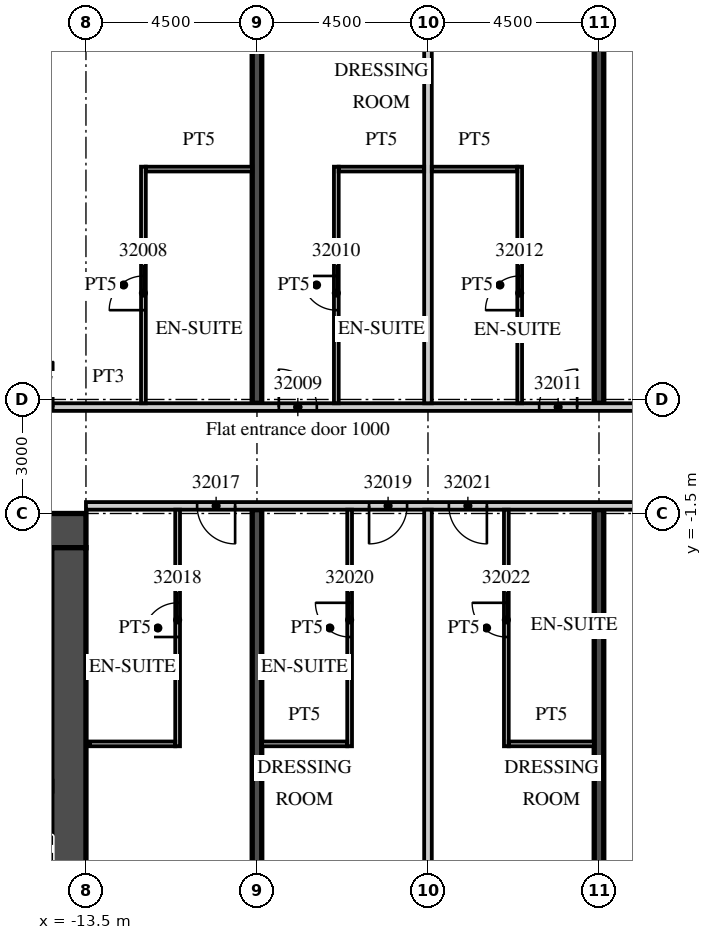
"""IFC4 building model, lengths in metres.
Left out: names, types, materials, properties, quantities, classifications, styles, units other than length and angle.
Written with IfcOpenShell. Run it as: python <this file> out.ifc"""

import sys

from ifc_helpers import new_model, si_unit, direction, frame, frame_2d, origin, place, context, subcontext, project, spatial, rectangle, extrude, element, fill, save


model = new_model("IFC4")
c1 = context("Model", 3, precision=1e-05, world=origin(), true_north=direction((0.0, 1.0)))
c2 = subcontext(c1, "Body", "Model", "MODEL_VIEW")
j1 = project(units=[si_unit("LENGTHUNIT", "METRE"), si_unit("PLANEANGLEUNIT", "RADIAN")], contexts=[c1])
p1 = place(None, origin())
s1 = spatial("IfcSite", under=j1, at=p1, CompositionType="ELEMENT")
p2 = place(p1, origin())
s2 = spatial("IfcBuilding", under=s1, at=p2, CompositionType="ELEMENT")
p3 = place(p2, frame((0.0, 0.0, 140.5)))
s3 = spatial("IfcBuildingStorey", under=s2, at=p3, CompositionType="ELEMENT", Elevation=140.5)
p4 = place(p3, frame((-9.0, -21.777, 0.0), z_axis=(0.0, 0.0, 1.0), x_axis=(0.0, 1.0, 0.0)))
e1 = element("IfcWall", 1, at=p4, inside=s3, PredefinedType="SHEAR", context=c2, shape_type="SweptSolid", body=[
    extrude(rectangle(XDim=20.377, YDim=0.25, at=frame_2d((10.188, 0.0))), origin(), (0.0, 0.0, 1.0), 3.3),
])
p5 = place(p3, frame((-9.0, 1.4, 0.0), z_axis=(0.0, 0.0, 1.0), x_axis=(0.0, 1.0, 0.0)))
e2 = element("IfcWall", 2, at=p5, inside=s3, PredefinedType="SHEAR", context=c2, shape_type="SweptSolid", body=[
    extrude(rectangle(XDim=19.073, YDim=0.25, at=frame_2d((9.537, 0.0))), origin(), (0.0, 0.0, 1.0), 3.3),
])
p6 = place(p3, frame((0.0, -20.91, 0.0), z_axis=(0.0, 0.0, 1.0), x_axis=(0.0, 1.0, 0.0)))
e3 = element("IfcWall", 3, at=p6, inside=s3, PredefinedType="SHEAR", context=c2, shape_type="SweptSolid", body=[
    extrude(rectangle(XDim=19.51, YDim=0.25, at=frame_2d((9.755, 0.0))), origin(), (0.0, 0.0, 1.0), 3.3),
])
p7 = place(p3, frame((0.0, 1.4, 0.0), z_axis=(0.0, 0.0, 1.0), x_axis=(0.0, 1.0, 0.0)))
e4 = element("IfcWall", 4, at=p7, inside=s3, PredefinedType="SHEAR", context=c2, shape_type="SweptSolid", body=[
    extrude(rectangle(XDim=19.94, YDim=0.25, at=frame_2d((9.97, 0.0))), origin(), (0.0, 0.0, 1.0), 3.3),
])
p8 = place(p3, frame((-39.316, 1.3, 0.0), z_axis=(0.0, 0.0, 1.0), x_axis=(1.0, 0.0, 0.0)))
e5 = element("IfcWall", 5, at=p8, inside=s3, PredefinedType="PARTITIONING", context=c2, shape_type="SweptSolid", body=[
    extrude(rectangle(XDim=52.816, YDim=0.2, at=frame_2d((26.408, 0.0))), origin(), (0.0, 0.0, 1.0), 3.02),
])
p9 = place(p8, frame((0.15, 0.0, 0.0)))
e6 = element("IfcOpeningElement", 6, at=p9, cuts=e5, PredefinedType="OPENING", context=c2, shape_type="SweptSolid", body=[
    extrude(rectangle(XDim=0.9, YDim=2.1, at=frame_2d((0.45, 1.05))), frame((0.0, 0.11, 0.0), z_axis=(0.0, -1.0, 0.0), x_axis=(1.0, 0.0, 0.0)), (0.0, 0.0, 1.0), 0.22),
])
p10 = place(p8, frame((8.679, 0.0, 0.0)))
e7 = element("IfcOpeningElement", 7, at=p10, cuts=e5, PredefinedType="OPENING", context=c2, shape_type="SweptSolid", body=[
    extrude(rectangle(XDim=1.2, YDim=2.1, at=frame_2d((0.6, 1.05))), frame((0.0, 0.11, 0.0), z_axis=(0.0, -1.0, 0.0), x_axis=(1.0, 0.0, 0.0)), (0.0, 0.0, 1.0), 0.22),
])
p11 = place(p8, frame((17.678, 0.0, 0.0)))
e8 = element("IfcOpeningElement", 8, at=p11, cuts=e5, PredefinedType="OPENING", context=c2, shape_type="SweptSolid", body=[
    extrude(rectangle(XDim=1.2, YDim=2.1, at=frame_2d((0.6, 1.05))), frame((0.0, 0.11, 0.0), z_axis=(0.0, -1.0, 0.0), x_axis=(1.0, 0.0, 0.0)), (0.0, 0.0, 1.0), 0.22),
])
p12 = place(p8, frame((23.754, 0.0, 0.0)))
e9 = element("IfcOpeningElement", 9, at=p12, cuts=e5, PredefinedType="OPENING", context=c2, shape_type="SweptSolid", body=[
    extrude(rectangle(XDim=1.2, YDim=2.1, at=frame_2d((0.6, 1.05))), frame((0.0, 0.11, 0.0), z_axis=(0.0, -1.0, 0.0), x_axis=(1.0, 0.0, 0.0)), (0.0, 0.0, 1.0), 0.22),
])
p13 = place(p8, frame((30.891, 0.0, 0.0)))
e10 = element("IfcOpeningElement", 10, at=p13, cuts=e5, PredefinedType="OPENING", context=c2, shape_type="SweptSolid", body=[
    extrude(rectangle(XDim=1.0, YDim=2.1, at=frame_2d((0.5, 1.05))), frame((0.0, 0.11, 0.0), z_axis=(0.0, -1.0, 0.0), x_axis=(1.0, 0.0, 0.0)), (0.0, 0.0, 1.0), 0.22),
])
p14 = place(p8, frame((37.741, 0.0, 0.0)))
e11 = element("IfcOpeningElement", 11, at=p14, cuts=e5, PredefinedType="OPENING", context=c2, shape_type="SweptSolid", body=[
    extrude(rectangle(XDim=1.0, YDim=2.1, at=frame_2d((0.5, 1.05))), frame((0.0, 0.11, 0.0), z_axis=(0.0, -1.0, 0.0), x_axis=(1.0, 0.0, 0.0)), (0.0, 0.0, 1.0), 0.22),
])
p15 = place(p8, frame((41.754, 0.0, 0.0)))
e12 = element("IfcOpeningElement", 12, at=p15, cuts=e5, PredefinedType="OPENING", context=c2, shape_type="SweptSolid", body=[
    extrude(rectangle(XDim=1.2, YDim=2.1, at=frame_2d((0.6, 1.05))), frame((0.0, 0.11, 0.0), z_axis=(0.0, -1.0, 0.0), x_axis=(1.0, 0.0, 0.0)), (0.0, 0.0, 1.0), 0.22),
])
p16 = place(p8, frame((48.891, 0.0, 0.0)))
e13 = element("IfcOpeningElement", 13, at=p16, cuts=e5, PredefinedType="OPENING", context=c2, shape_type="SweptSolid", body=[
    extrude(rectangle(XDim=1.0, YDim=2.1, at=frame_2d((0.5, 1.05))), frame((0.0, 0.11, 0.0), z_axis=(0.0, -1.0, 0.0), x_axis=(1.0, 0.0, 0.0)), (0.0, 0.0, 1.0), 0.22),
])
p17 = place(p3, frame((-11.988, 1.4, 0.0), z_axis=(0.0, 0.0, 1.0), x_axis=(0.0, 1.0, 0.0)))
e14 = element("IfcWall", 14, at=p17, inside=s3, PredefinedType="PARTITIONING", context=c2, shape_type="SweptSolid", body=[
    extrude(rectangle(XDim=6.225, YDim=0.125, at=frame_2d((3.113, 0.0))), origin(), (0.0, 0.0, 1.0), 3.02),
])
p18 = place(p17, frame((2.45, 0.0, 0.0)))
e15 = element("IfcOpeningElement", 15, at=p18, cuts=e14, PredefinedType="OPENING", context=c2, shape_type="SweptSolid", body=[
    extrude(rectangle(XDim=0.9, YDim=2.1, at=frame_2d((0.45, 1.05))), frame((0.0, 0.073, 0.0), z_axis=(0.0, -1.0, 0.0), x_axis=(1.0, 0.0, 0.0)), (0.0, 0.0, 1.0), 0.145),
])
p19 = place(p3, frame((-11.925, 7.562, 0.0), z_axis=(0.0, 0.0, 1.0), x_axis=(1.0, 0.0, 0.0)))
e16 = element("IfcWall", 16, at=p19, inside=s3, PredefinedType="PARTITIONING", context=c2, shape_type="SweptSolid", body=[
    extrude(rectangle(XDim=2.8, YDim=0.125, at=frame_2d((1.4, 0.0))), origin(), (0.0, 0.0, 1.0), 3.02),
])
p20 = place(p3, frame((-4.5, 1.4, 0.0), z_axis=(0.0, 0.0, 1.0), x_axis=(0.0, 1.0, 0.0)))
e17 = element("IfcWall", 17, at=p20, inside=s3, PredefinedType="PARTITIONING", context=c2, shape_type="SweptSolid", body=[
    extrude(rectangle(XDim=19.529, YDim=0.2, at=frame_2d((9.765, 0.0))), origin(), (0.0, 0.0, 1.0), 3.02),
])
p21 = place(p3, frame((-6.912, 1.4, 0.0), z_axis=(0.0, 0.0, 1.0), x_axis=(0.0, 1.0, 0.0)))
e18 = element("IfcWall", 18, at=p21, inside=s3, PredefinedType="PARTITIONING", context=c2, shape_type="SweptSolid", body=[
    extrude(rectangle(XDim=6.225, YDim=0.125, at=frame_2d((3.113, 0.0))), origin(), (0.0, 0.0, 1.0), 3.02),
])
p22 = place(p21, frame((2.45, 0.0, 0.0)))
e19 = element("IfcOpeningElement", 19, at=p22, cuts=e18, PredefinedType="OPENING", context=c2, shape_type="SweptSolid", body=[
    extrude(rectangle(XDim=0.9, YDim=2.1, at=frame_2d((0.45, 1.05))), frame((0.0, 0.073, 0.0), z_axis=(0.0, -1.0, 0.0), x_axis=(1.0, 0.0, 0.0)), (0.0, 0.0, 1.0), 0.145),
])
p23 = place(p3, frame((-6.85, 7.562, 0.0), z_axis=(0.0, 0.0, 1.0), x_axis=(1.0, 0.0, 0.0)))
e20 = element("IfcWall", 20, at=p23, inside=s3, PredefinedType="PARTITIONING", context=c2, shape_type="SweptSolid", body=[
    extrude(rectangle(XDim=2.25, YDim=0.125, at=frame_2d((1.125, 0.0))), origin(), (0.0, 0.0, 1.0), 3.02),
])
p24 = place(p3, frame((-2.087, 1.4, 0.0), z_axis=(0.0, 0.0, 1.0), x_axis=(0.0, 1.0, 0.0)))
e21 = element("IfcWall", 21, at=p24, inside=s3, PredefinedType="PARTITIONING", context=c2, shape_type="SweptSolid", body=[
    extrude(rectangle(XDim=6.225, YDim=0.125, at=frame_2d((3.113, 0.0))), origin(), (0.0, 0.0, 1.0), 3.02),
])
p25 = place(p24, frame((2.45, 0.0, 0.0)))
e22 = element("IfcOpeningElement", 22, at=p25, cuts=e21, PredefinedType="OPENING", context=c2, shape_type="SweptSolid", body=[
    extrude(rectangle(XDim=0.9, YDim=2.1, at=frame_2d((0.45, 1.05))), frame((0.0, 0.073, 0.0), z_axis=(0.0, -1.0, 0.0), x_axis=(1.0, 0.0, 0.0)), (0.0, 0.0, 1.0), 0.145),
])
p26 = place(p3, frame((-4.4, 7.562, 0.0), z_axis=(0.0, 0.0, 1.0), x_axis=(1.0, 0.0, 0.0)))
e23 = element("IfcWall", 23, at=p26, inside=s3, PredefinedType="PARTITIONING", context=c2, shape_type="SweptSolid", body=[
    extrude(rectangle(XDim=2.25, YDim=0.125, at=frame_2d((1.125, 0.0))), origin(), (0.0, 0.0, 1.0), 3.02),
])
p27 = place(p3, frame((-13.5, -1.3, 0.0), z_axis=(0.0, 0.0, 1.0), x_axis=(1.0, 0.0, 0.0)))
e24 = element("IfcWall", 24, at=p27, inside=s3, PredefinedType="PARTITIONING", context=c2, shape_type="SweptSolid", body=[
    extrude(rectangle(XDim=60.932, YDim=0.2, at=frame_2d((30.466, 0.0))), origin(), (0.0, 0.0, 1.0), 3.02),
])
p28 = place(p27, frame((2.925, 0.0, 0.0)))
e25 = element("IfcOpeningElement", 25, at=p28, cuts=e24, PredefinedType="OPENING", context=c2, shape_type="SweptSolid", body=[
    extrude(rectangle(XDim=1.0, YDim=2.1, at=frame_2d((0.5, 1.05))), frame((0.0, 0.11, 0.0), z_axis=(0.0, -1.0, 0.0), x_axis=(1.0, 0.0, 0.0)), (0.0, 0.0, 1.0), 0.22),
])
p29 = place(p27, frame((7.45, 0.0, 0.0)))
e26 = element("IfcOpeningElement", 26, at=p29, cuts=e24, PredefinedType="OPENING", context=c2, shape_type="SweptSolid", body=[
    extrude(rectangle(XDim=1.0, YDim=2.1, at=frame_2d((0.5, 1.05))), frame((0.0, 0.11, 0.0), z_axis=(0.0, -1.0, 0.0), x_axis=(1.0, 0.0, 0.0)), (0.0, 0.0, 1.0), 0.22),
])
p30 = place(p27, frame((9.55, 0.0, 0.0)))
e27 = element("IfcOpeningElement", 27, at=p30, cuts=e24, PredefinedType="OPENING", context=c2, shape_type="SweptSolid", body=[
    extrude(rectangle(XDim=1.0, YDim=2.1, at=frame_2d((0.5, 1.05))), frame((0.0, 0.11, 0.0), z_axis=(0.0, -1.0, 0.0), x_axis=(1.0, 0.0, 0.0)), (0.0, 0.0, 1.0), 0.22),
])
p31 = place(p27, frame((15.938, 0.0, 0.0)))
e28 = element("IfcOpeningElement", 28, at=p31, cuts=e24, PredefinedType="OPENING", context=c2, shape_type="SweptSolid", body=[
    extrude(rectangle(XDim=1.2, YDim=2.1, at=frame_2d((0.6, 1.05))), frame((0.0, 0.11, 0.0), z_axis=(0.0, -1.0, 0.0), x_axis=(1.0, 0.0, 0.0)), (0.0, 0.0, 1.0), 0.22),
])
p32 = place(p27, frame((24.938, 0.0, 0.0)))
e29 = element("IfcOpeningElement", 29, at=p32, cuts=e24, PredefinedType="OPENING", context=c2, shape_type="SweptSolid", body=[
    extrude(rectangle(XDim=1.2, YDim=2.1, at=frame_2d((0.6, 1.05))), frame((0.0, 0.11, 0.0), z_axis=(0.0, -1.0, 0.0), x_axis=(1.0, 0.0, 0.0)), (0.0, 0.0, 1.0), 0.22),
])
p33 = place(p27, frame((32.075, 0.0, 0.0)))
e30 = element("IfcOpeningElement", 30, at=p33, cuts=e24, PredefinedType="OPENING", context=c2, shape_type="SweptSolid", body=[
    extrude(rectangle(XDim=1.0, YDim=2.1, at=frame_2d((0.5, 1.05))), frame((0.0, 0.11, 0.0), z_axis=(0.0, -1.0, 0.0), x_axis=(1.0, 0.0, 0.0)), (0.0, 0.0, 1.0), 0.22),
])
p34 = place(p27, frame((36.55, 0.0, 0.0)))
e31 = element("IfcOpeningElement", 31, at=p34, cuts=e24, PredefinedType="OPENING", context=c2, shape_type="SweptSolid", body=[
    extrude(rectangle(XDim=1.0, YDim=2.1, at=frame_2d((0.5, 1.05))), frame((0.0, 0.11, 0.0), z_axis=(0.0, -1.0, 0.0), x_axis=(1.0, 0.0, 0.0)), (0.0, 0.0, 1.0), 0.22),
])
p35 = place(p27, frame((45.862, 0.0, 0.0)))
e32 = element("IfcOpeningElement", 32, at=p35, cuts=e24, PredefinedType="OPENING", context=c2, shape_type="SweptSolid", body=[
    extrude(rectangle(XDim=1.2, YDim=2.1, at=frame_2d((0.6, 1.05))), frame((0.0, 0.11, 0.0), z_axis=(0.0, -1.0, 0.0), x_axis=(1.0, 0.0, 0.0)), (0.0, 0.0, 1.0), 0.22),
])
p36 = place(p27, frame((50.075, 0.0, 0.0)))
e33 = element("IfcOpeningElement", 33, at=p36, cuts=e24, PredefinedType="OPENING", context=c2, shape_type="SweptSolid", body=[
    extrude(rectangle(XDim=1.0, YDim=2.1, at=frame_2d((0.5, 1.05))), frame((0.0, 0.11, 0.0), z_axis=(0.0, -1.0, 0.0), x_axis=(1.0, 0.0, 0.0)), (0.0, 0.0, 1.0), 0.22),
])
p37 = place(p27, frame((56.95, 0.0, 0.0)))
e34 = element("IfcOpeningElement", 34, at=p37, cuts=e24, PredefinedType="OPENING", context=c2, shape_type="SweptSolid", body=[
    extrude(rectangle(XDim=1.0, YDim=2.1, at=frame_2d((0.5, 1.05))), frame((0.0, 0.11, 0.0), z_axis=(0.0, -1.0, 0.0), x_axis=(1.0, 0.0, 0.0)), (0.0, 0.0, 1.0), 0.22),
])
p38 = place(p27, frame((59.882, 0.0, 0.0)))
e35 = element("IfcOpeningElement", 35, at=p38, cuts=e24, PredefinedType="OPENING", context=c2, shape_type="SweptSolid", body=[
    extrude(rectangle(XDim=0.9, YDim=2.1, at=frame_2d((0.45, 1.05))), frame((0.0, 0.11, 0.0), z_axis=(0.0, -1.0, 0.0), x_axis=(1.0, 0.0, 0.0)), (0.0, 0.0, 1.0), 0.22),
])
p39 = place(p3, frame((-11.088, -7.625, 0.0), z_axis=(0.0, 0.0, 1.0), x_axis=(0.0, 1.0, 0.0)))
e36 = element("IfcWall", 36, at=p39, inside=s3, PredefinedType="PARTITIONING", context=c2, shape_type="SweptSolid", body=[
    extrude(rectangle(XDim=6.225, YDim=0.125, at=frame_2d((3.113, 0.0))), origin(), (0.0, 0.0, 1.0), 3.02),
])
p40 = place(p39, frame((2.875, 0.0, 0.0)))
e37 = element("IfcOpeningElement", 37, at=p40, cuts=e36, PredefinedType="OPENING", context=c2, shape_type="SweptSolid", body=[
    extrude(rectangle(XDim=0.9, YDim=2.1, at=frame_2d((0.45, 1.05))), frame((0.0, 0.073, 0.0), z_axis=(0.0, -1.0, 0.0), x_axis=(1.0, 0.0, 0.0)), (0.0, 0.0, 1.0), 0.145),
])
p41 = place(p3, frame((-13.4, -7.562, 0.0), z_axis=(0.0, 0.0, 1.0), x_axis=(1.0, 0.0, 0.0)))
e38 = element("IfcWall", 38, at=p41, inside=s3, PredefinedType="PARTITIONING", context=c2, shape_type="SweptSolid", body=[
    extrude(rectangle(XDim=2.25, YDim=0.125, at=frame_2d((1.125, 0.0))), origin(), (0.0, 0.0, 1.0), 3.02),
])
p42 = place(p3, frame((-4.5, -21.366, 0.0), z_axis=(0.0, 0.0, 1.0), x_axis=(0.0, 1.0, 0.0)))
e39 = element("IfcWall", 39, at=p42, inside=s3, PredefinedType="PARTITIONING", context=c2, shape_type="SweptSolid", body=[
    extrude(rectangle(XDim=19.966, YDim=0.2, at=frame_2d((9.983, 0.0))), origin(), (0.0, 0.0, 1.0), 3.02),
])
p43 = place(p3, frame((-6.562, -7.625, 0.0), z_axis=(0.0, 0.0, 1.0), x_axis=(0.0, 1.0, 0.0)))
e40 = element("IfcWall", 40, at=p43, inside=s3, PredefinedType="PARTITIONING", context=c2, shape_type="SweptSolid", body=[
    extrude(rectangle(XDim=6.225, YDim=0.125, at=frame_2d((3.113, 0.0))), origin(), (0.0, 0.0, 1.0), 3.02),
])
p44 = place(p43, frame((2.875, 0.0, 0.0)))
e41 = element("IfcOpeningElement", 41, at=p44, cuts=e40, PredefinedType="OPENING", context=c2, shape_type="SweptSolid", body=[
    extrude(rectangle(XDim=0.9, YDim=2.1, at=frame_2d((0.45, 1.05))), frame((0.0, 0.073, 0.0), z_axis=(0.0, -1.0, 0.0), x_axis=(1.0, 0.0, 0.0)), (0.0, 0.0, 1.0), 0.145),
])
p45 = place(p3, frame((-8.875, -7.562, 0.0), z_axis=(0.0, 0.0, 1.0), x_axis=(1.0, 0.0, 0.0)))
e42 = element("IfcWall", 42, at=p45, inside=s3, PredefinedType="PARTITIONING", context=c2, shape_type="SweptSolid", body=[
    extrude(rectangle(XDim=2.25, YDim=0.125, at=frame_2d((1.125, 0.0))), origin(), (0.0, 0.0, 1.0), 3.02),
])
p46 = place(p3, frame((-2.438, -7.625, 0.0), z_axis=(0.0, 0.0, 1.0), x_axis=(0.0, 1.0, 0.0)))
e43 = element("IfcWall", 43, at=p46, inside=s3, PredefinedType="PARTITIONING", context=c2, shape_type="SweptSolid", body=[
    extrude(rectangle(XDim=6.225, YDim=0.125, at=frame_2d((3.113, 0.0))), origin(), (0.0, 0.0, 1.0), 3.02),
])
p47 = place(p46, frame((2.875, 0.0, 0.0)))
e44 = element("IfcOpeningElement", 44, at=p47, cuts=e43, PredefinedType="OPENING", context=c2, shape_type="SweptSolid", body=[
    extrude(rectangle(XDim=0.9, YDim=2.1, at=frame_2d((0.45, 1.05))), frame((0.0, 0.073, 0.0), z_axis=(0.0, -1.0, 0.0), x_axis=(1.0, 0.0, 0.0)), (0.0, 0.0, 1.0), 0.145),
])
p48 = place(p3, frame((-2.375, -7.562, 0.0), z_axis=(0.0, 0.0, 1.0), x_axis=(1.0, 0.0, 0.0)))
e45 = element("IfcWall", 45, at=p48, inside=s3, PredefinedType="PARTITIONING", context=c2, shape_type="SweptSolid", body=[
    extrude(rectangle(XDim=2.25, YDim=0.125, at=frame_2d((1.125, 0.0))), origin(), (0.0, 0.0, 1.0), 3.02),
])
p49 = place(p3, frame((-31.5, -1.95, 0.0), z_axis=(0.0, 0.0, 1.0), x_axis=(1.0, 0.0, 0.0)))
e46 = element("IfcWall", 46, at=p49, inside=s3, PredefinedType="SHEAR", context=c2, shape_type="SweptSolid", body=[
    extrude(rectangle(XDim=18.0, YDim=0.9, at=frame_2d((9.0, 0.0))), origin(), (0.0, 0.0, 1.0), 3.02),
])
p50 = place(p49, frame((14.725, 0.0, 0.0)))
e47 = element("IfcOpeningElement", 47, at=p50, cuts=e46, PredefinedType="OPENING", context=c2, shape_type="SweptSolid", body=[
    extrude(rectangle(XDim=1.8, YDim=2.1, at=frame_2d((0.9, 1.05))), frame((0.0, 0.46, 0.0), z_axis=(0.0, -1.0, 0.0), x_axis=(1.0, 0.0, 0.0)), (0.0, 0.0, 1.0), 0.92),
])
p51 = place(p3, frame((-13.95, -14.6, 0.0), z_axis=(0.0, 0.0, 1.0), x_axis=(0.0, 1.0, 0.0)))
e48 = element("IfcWall", 48, at=p51, inside=s3, PredefinedType="SHEAR", context=c2, shape_type="SweptSolid", body=[
    extrude(rectangle(XDim=12.2, YDim=0.9, at=frame_2d((6.1, 0.0))), origin(), (0.0, 0.0, 1.0), 3.02),
])
p52 = place(p12, origin())
e49 = element("IfcDoor", 49, at=p52, inside=s3, OperationType="SINGLE_SWING_RIGHT", PredefinedType="DOOR", context=c2, shape_type="SweptSolid", body=[
    extrude(rectangle(XDim=1.2, YDim=2.1, at=frame_2d((0.6, 1.05))), frame((0.0, 0.025, 0.0), z_axis=(0.0, -1.0, 0.0), x_axis=(1.0, 0.0, 0.0)), (0.0, 0.0, 1.0), 0.05),
])
fill(e9, e49)
p53 = place(p18, origin())
e50 = element("IfcDoor", 50, at=p53, inside=s3, OperationType="SINGLE_SWING_LEFT", PredefinedType="DOOR", context=c2, shape_type="SweptSolid", body=[
    extrude(rectangle(XDim=0.9, YDim=2.1, at=frame_2d((0.45, 1.05))), frame((0.0, 0.025, 0.0), z_axis=(0.0, -1.0, 0.0), x_axis=(1.0, 0.0, 0.0)), (0.0, 0.0, 1.0), 0.05),
])
fill(e15, e50)
p54 = place(p13, origin())
e51 = element("IfcDoor", 51, at=p54, inside=s3, OperationType="SINGLE_SWING_LEFT", PredefinedType="DOOR", context=c2, shape_type="SweptSolid", body=[
    extrude(rectangle(XDim=1.0, YDim=2.1, at=frame_2d((0.5, 1.05))), frame((0.0, 0.025, 0.0), z_axis=(0.0, -1.0, 0.0), x_axis=(1.0, 0.0, 0.0)), (0.0, 0.0, 1.0), 0.05),
])
fill(e10, e51)
p55 = place(p22, origin())
e52 = element("IfcDoor", 52, at=p55, inside=s3, OperationType="SINGLE_SWING_RIGHT", PredefinedType="DOOR", context=c2, shape_type="SweptSolid", body=[
    extrude(rectangle(XDim=0.9, YDim=2.1, at=frame_2d((0.45, 1.05))), frame((0.0, 0.025, 0.0), z_axis=(0.0, -1.0, 0.0), x_axis=(1.0, 0.0, 0.0)), (0.0, 0.0, 1.0), 0.05),
])
fill(e19, e52)
p56 = place(p14, origin())
e53 = element("IfcDoor", 53, at=p56, inside=s3, OperationType="SINGLE_SWING_RIGHT", PredefinedType="DOOR", context=c2, shape_type="SweptSolid", body=[
    extrude(rectangle(XDim=1.0, YDim=2.1, at=frame_2d((0.5, 1.05))), frame((0.0, 0.025, 0.0), z_axis=(0.0, -1.0, 0.0), x_axis=(1.0, 0.0, 0.0)), (0.0, 0.0, 1.0), 0.05),
])
fill(e11, e53)
p57 = place(p25, origin())
e54 = element("IfcDoor", 54, at=p57, inside=s3, OperationType="SINGLE_SWING_LEFT", PredefinedType="DOOR", context=c2, shape_type="SweptSolid", body=[
    extrude(rectangle(XDim=0.9, YDim=2.1, at=frame_2d((0.45, 1.05))), frame((0.0, 0.025, 0.0), z_axis=(0.0, -1.0, 0.0), x_axis=(1.0, 0.0, 0.0)), (0.0, 0.0, 1.0), 0.05),
])
fill(e22, e54)
p58 = place(p28, origin())
e55 = element("IfcDoor", 55, at=p58, inside=s3, OperationType="SINGLE_SWING_RIGHT", PredefinedType="DOOR", context=c2, shape_type="SweptSolid", body=[
    extrude(rectangle(XDim=1.0, YDim=2.1, at=frame_2d((0.5, 1.05))), frame((0.0, 0.025, 0.0), z_axis=(0.0, -1.0, 0.0), x_axis=(1.0, 0.0, 0.0)), (0.0, 0.0, 1.0), 0.05),
])
fill(e25, e55)
p59 = place(p40, origin())
e56 = element("IfcDoor", 56, at=p59, inside=s3, OperationType="SINGLE_SWING_LEFT", PredefinedType="DOOR", context=c2, shape_type="SweptSolid", body=[
    extrude(rectangle(XDim=0.9, YDim=2.1, at=frame_2d((0.45, 1.05))), frame((0.0, 0.025, 0.0), z_axis=(0.0, -1.0, 0.0), x_axis=(1.0, 0.0, 0.0)), (0.0, 0.0, 1.0), 0.05),
])
fill(e37, e56)
p60 = place(p29, origin())
e57 = element("IfcDoor", 57, at=p60, inside=s3, OperationType="SINGLE_SWING_LEFT", PredefinedType="DOOR", context=c2, shape_type="SweptSolid", body=[
    extrude(rectangle(XDim=1.0, YDim=2.1, at=frame_2d((0.5, 1.05))), frame((0.0, 0.025, 0.0), z_axis=(0.0, -1.0, 0.0), x_axis=(1.0, 0.0, 0.0)), (0.0, 0.0, 1.0), 0.05),
])
fill(e26, e57)
p61 = place(p44, origin())
e58 = element("IfcDoor", 58, at=p61, inside=s3, OperationType="SINGLE_SWING_RIGHT", PredefinedType="DOOR", context=c2, shape_type="SweptSolid", body=[
    extrude(rectangle(XDim=0.9, YDim=2.1, at=frame_2d((0.45, 1.05))), frame((0.0, 0.025, 0.0), z_axis=(0.0, -1.0, 0.0), x_axis=(1.0, 0.0, 0.0)), (0.0, 0.0, 1.0), 0.05),
])
fill(e41, e58)
p62 = place(p30, origin())
e59 = element("IfcDoor", 59, at=p62, inside=s3, OperationType="SINGLE_SWING_RIGHT", PredefinedType="DOOR", context=c2, shape_type="SweptSolid", body=[
    extrude(rectangle(XDim=1.0, YDim=2.1, at=frame_2d((0.5, 1.05))), frame((0.0, 0.025, 0.0), z_axis=(0.0, -1.0, 0.0), x_axis=(1.0, 0.0, 0.0)), (0.0, 0.0, 1.0), 0.05),
])
fill(e27, e59)
p63 = place(p47, origin())
e60 = element("IfcDoor", 60, at=p63, inside=s3, OperationType="SINGLE_SWING_RIGHT", PredefinedType="DOOR", context=c2, shape_type="SweptSolid", body=[
    extrude(rectangle(XDim=0.9, YDim=2.1, at=frame_2d((0.45, 1.05))), frame((0.0, 0.025, 0.0), z_axis=(0.0, -1.0, 0.0), x_axis=(1.0, 0.0, 0.0)), (0.0, 0.0, 1.0), 0.05),
])
fill(e44, e60)
save(model, sys.argv[1])
